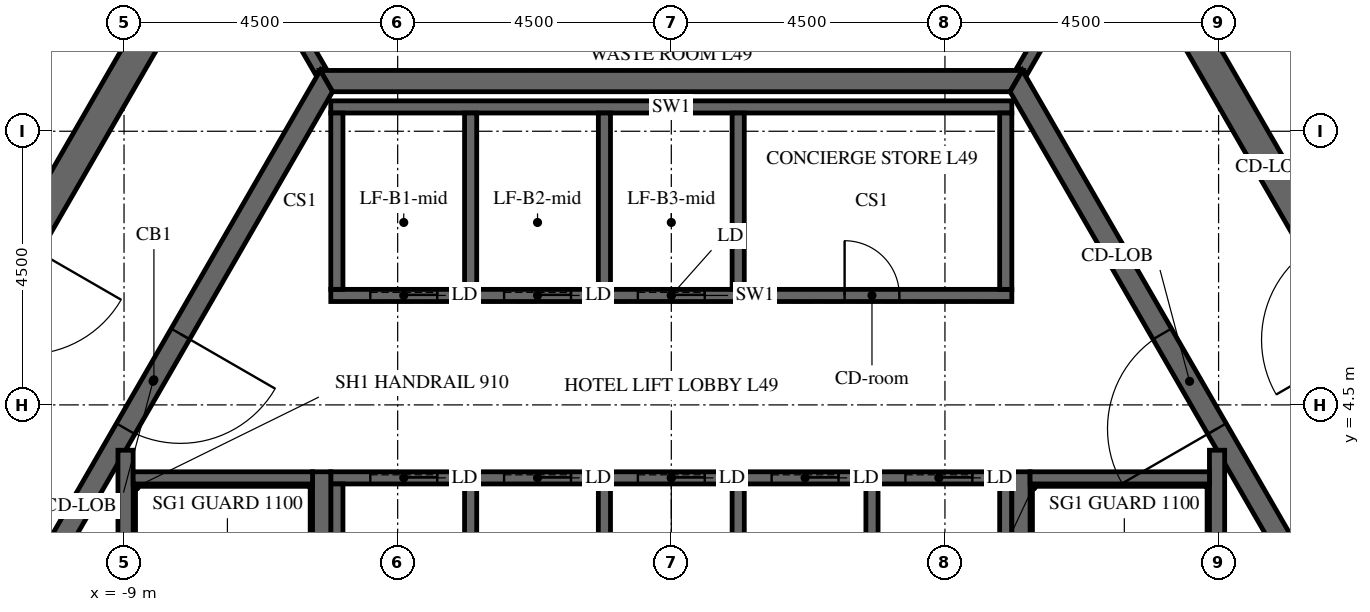
"""IFC4 building model, lengths in metres.
Left out: names, types, materials, properties, quantities, classifications, styles, units other than length and angle.
Written with IfcOpenShell. Run it as: python <this file> out.ifc"""

import sys

from ifc_helpers import new_model, si_unit, direction, frame, frame_2d, origin, place, context, subcontext, project, spatial, polyline, rectangle, outline, extrude, element, fill, save


model = new_model("IFC4")
c1 = context("Model", 3, precision=1e-05, world=origin(), true_north=direction((0.0, 1.0)))
c2 = subcontext(c1, "Body", "Model", "MODEL_VIEW")
j1 = project(units=[si_unit("LENGTHUNIT", "METRE"), si_unit("PLANEANGLEUNIT", "RADIAN")], contexts=[c1])
p1 = place(None, origin())
s1 = spatial("IfcSite", under=j1, at=p1, CompositionType="ELEMENT")
p2 = place(p1, origin())
s2 = spatial("IfcBuilding", under=s1, at=p2, CompositionType="ELEMENT")
p3 = place(p2, frame((0.0, 0.0, 207.3)))
s3 = spatial("IfcBuildingStorey", under=s2, at=p3, CompositionType="ELEMENT", Elevation=207.3)
p4 = place(p3, frame((-7.361, 12.75, -0.15), z_axis=(0.0, 0.0, 1.0), x_axis=(-0.50000571537, -0.866022103989, 0.0)))
e1 = element("IfcWall", 1, at=p4, inside=s3, PredefinedType="SHEAR", context=c2, shape_type="SweptSolid", body=[
    extrude(outline(polyline([(-0.144, -0.25), (14.867, -0.25), (14.578, 0.25), (0.144, 0.25), (-0.144, -0.25)])), origin(), (0.0, 0.0, 1.0), 3.9),
])
p5 = place(p4, frame((6.49, 0.0, 0.15)))
e2 = element("IfcOpeningElement", 2, at=p5, cuts=e1, PredefinedType="OPENING", context=c2, shape_type="SweptSolid", body=[
    extrude(rectangle(XDim=1.8, YDim=2.4, at=frame_2d((0.9, 1.2))), frame((0.0, 0.26, 0.0), z_axis=(0.0, -1.0, 0.0), x_axis=(1.0, 0.0, 0.0)), (0.0, 0.0, 1.0), 0.52),
])
p6 = place(p3, frame((14.722, 0.0, -0.15), z_axis=(0.0, 0.0, 1.0), x_axis=(-0.50000571537, 0.866022103989, 0.0)))
e3 = element("IfcWall", 3, at=p6, inside=s3, PredefinedType="SHEAR", context=c2, shape_type="SweptSolid", body=[
    extrude(outline(polyline([(-0.144, -0.25), (14.867, -0.25), (14.578, 0.25), (0.144, 0.25), (-0.144, -0.25)])), origin(), (0.0, 0.0, 1.0), 3.9),
])
p7 = place(p6, frame((6.432, 0.0, 0.15)))
e4 = element("IfcOpeningElement", 4, at=p7, cuts=e3, PredefinedType="OPENING", context=c2, shape_type="SweptSolid", body=[
    extrude(rectangle(XDim=1.8, YDim=2.4, at=frame_2d((0.9, 1.2))), frame((0.0, 0.26, 0.0), z_axis=(0.0, -1.0, 0.0), x_axis=(1.0, 0.0, 0.0)), (0.0, 0.0, 1.0), 0.52),
])
p8 = place(p3, frame((-5.673, 9.825, -0.15), z_axis=(0.0, 0.0, 1.0), x_axis=(-0.499995046907, -0.866028263435, 0.0)))
e5 = element("IfcWall", 5, at=p8, inside=s3, PredefinedType="SHEAR", context=c2, shape_type="SweptSolid", body=[
    extrude(outline(polyline([(-0.101, -0.175), (11.446, -0.175), (11.244, 0.175), (0.101, 0.175), (-0.101, -0.175)])), origin(), (0.0, 0.0, 1.0), 3.9),
])
p9 = place(p8, frame((4.801, 0.0, 0.15)))
e6 = element("IfcOpeningElement", 6, at=p9, cuts=e5, PredefinedType="OPENING", context=c2, shape_type="SweptSolid", body=[
    extrude(rectangle(XDim=1.8, YDim=2.4, at=frame_2d((0.9, 1.2))), frame((0.0, 0.185, 0.0), z_axis=(0.0, -1.0, 0.0), x_axis=(1.0, 0.0, 0.0)), (0.0, 0.0, 1.0), 0.37),
])
p10 = place(p3, frame((11.345, 0.0, -0.15), z_axis=(0.0, 0.0, 1.0), x_axis=(-0.499995046907, 0.866028263435, 0.0)))
e7 = element("IfcWall", 7, at=p10, inside=s3, PredefinedType="SHEAR", context=c2, shape_type="SweptSolid", body=[
    extrude(outline(polyline([(-0.101, -0.175), (11.446, -0.175), (11.244, 0.175), (0.101, 0.175), (-0.101, -0.175)])), origin(), (0.0, 0.0, 1.0), 3.9),
])
p11 = place(p10, frame((4.744, 0.0, 0.15)))
e8 = element("IfcOpeningElement", 8, at=p11, cuts=e7, PredefinedType="OPENING", context=c2, shape_type="SweptSolid", body=[
    extrude(rectangle(XDim=1.8, YDim=2.4, at=frame_2d((0.9, 1.2))), frame((0.0, 0.185, 0.0), z_axis=(0.0, -1.0, 0.0), x_axis=(1.0, 0.0, 0.0)), (0.0, 0.0, 1.0), 0.37),
])
p12 = place(p3, frame((5.673, 9.825, -0.15), z_axis=(0.0, 0.0, 1.0), x_axis=(-1.0, 0.0, 0.0)))
e9 = element("IfcWall", 9, at=p12, inside=s3, PredefinedType="SHEAR", context=c2, shape_type="SweptSolid", body=[
    extrude(outline(polyline([(-0.101, -0.175), (11.446, -0.175), (11.244, 0.175), (0.101, 0.175), (-0.101, -0.175)])), origin(), (0.0, 0.0, 1.0), 3.9),
])
p13 = place(p3, frame((-5.6, 6.3, -0.25), z_axis=(0.0, 0.0, 1.0), x_axis=(1.0, 0.0, 0.0)))
e10 = element("IfcWall", 10, at=p13, inside=s3, PredefinedType="SHEAR", context=c2, shape_type="SweptSolid", body=[
    extrude(rectangle(XDim=11.2, YDim=0.2, at=frame_2d((5.6, 0.0))), origin(), (0.0, 0.0, 1.0), 3.9),
])
p14 = place(p13, frame((8.45, 0.0, 0.25)))
e11 = element("IfcOpeningElement", 11, at=p14, cuts=e10, PredefinedType="OPENING", context=c2, shape_type="SweptSolid", body=[
    extrude(rectangle(XDim=0.9, YDim=2.1, at=frame_2d((0.45, 1.05))), frame((0.0, 0.11, 0.0), z_axis=(0.0, -1.0, 0.0), x_axis=(1.0, 0.0, 0.0)), (0.0, 0.0, 1.0), 0.22),
])
p15 = place(p13, frame((0.65, 0.0, 0.25)))
e12 = element("IfcOpeningElement", 12, at=p15, cuts=e10, PredefinedType="OPENING", context=c2, shape_type="SweptSolid", body=[
    extrude(rectangle(XDim=1.1, YDim=2.1, at=frame_2d((0.55, 1.05))), frame((0.0, 0.11, 0.0), z_axis=(0.0, -1.0, 0.0), x_axis=(1.0, 0.0, 0.0)), (0.0, 0.0, 1.0), 0.22),
])
p16 = place(p13, frame((2.85, 0.0, 0.25)))
e13 = element("IfcOpeningElement", 13, at=p16, cuts=e10, PredefinedType="OPENING", context=c2, shape_type="SweptSolid", body=[
    extrude(rectangle(XDim=1.1, YDim=2.1, at=frame_2d((0.55, 1.05))), frame((0.0, 0.11, 0.0), z_axis=(0.0, -1.0, 0.0), x_axis=(1.0, 0.0, 0.0)), (0.0, 0.0, 1.0), 0.22),
])
p17 = place(p13, frame((5.05, 0.0, 0.25)))
e14 = element("IfcOpeningElement", 14, at=p17, cuts=e10, PredefinedType="OPENING", context=c2, shape_type="SweptSolid", body=[
    extrude(rectangle(XDim=1.1, YDim=2.1, at=frame_2d((0.55, 1.05))), frame((0.0, 0.11, 0.0), z_axis=(0.0, -1.0, 0.0), x_axis=(1.0, 0.0, 0.0)), (0.0, 0.0, 1.0), 0.22),
])
p18 = place(p3, frame((-5.6, 9.4, -0.25), z_axis=(0.0, 0.0, 1.0), x_axis=(1.0, 0.0, 0.0)))
e15 = element("IfcWall", 15, at=p18, inside=s3, PredefinedType="SHEAR", context=c2, shape_type="SweptSolid", body=[
    extrude(rectangle(XDim=11.2, YDim=0.2, at=frame_2d((5.6, 0.0))), origin(), (0.0, 0.0, 1.0), 3.9),
])
for number, where, z_axis, x_axis in (
    (16, (-5.5, 6.4, -0.25), (0.0, 0.0, 1.0), (0.0, 1.0, 0.0)),
    (17, (-3.3, 6.4, -0.25), (0.0, 0.0, 1.0), (0.0, 1.0, 0.0)),
    (18, (-1.1, 6.4, -0.25), (0.0, 0.0, 1.0), (0.0, 1.0, 0.0)),
    (19, (1.1, 6.4, -0.25), (0.0, 0.0, 1.0), (0.0, 1.0, 0.0)),
    (20, (5.5, 6.4, -0.25), (0.0, 0.0, 1.0), (0.0, 1.0, 0.0)),
):
    element("IfcWall", number, at=place(p3, frame(where, z_axis=z_axis, x_axis=x_axis)), inside=s3, PredefinedType="SHEAR", context=c2, shape_type="SweptSolid", body=[
        extrude(rectangle(XDim=2.9, YDim=0.2, at=frame_2d((1.45, 0.0))), origin(), (0.0, 0.0, 1.0), 3.9),
    ])
p19 = place(p3, frame((-5.6, 3.3, -0.25), z_axis=(0.0, 0.0, 1.0), x_axis=(1.0, 0.0, 0.0)))
e21 = element("IfcWall", 21, at=p19, inside=s3, PredefinedType="SHEAR", context=c2, shape_type="SweptSolid", body=[
    extrude(rectangle(XDim=11.2, YDim=0.2, at=frame_2d((5.6, 0.0))), origin(), (0.0, 0.0, 1.0), 3.9),
])
p20 = place(p19, frame((0.65, 0.0, 0.25)))
e22 = element("IfcOpeningElement", 22, at=p20, cuts=e21, PredefinedType="OPENING", context=c2, shape_type="SweptSolid", body=[
    extrude(rectangle(XDim=1.1, YDim=2.1, at=frame_2d((0.55, 1.05))), frame((0.0, 0.11, 0.0), z_axis=(0.0, -1.0, 0.0), x_axis=(1.0, 0.0, 0.0)), (0.0, 0.0, 1.0), 0.22),
])
p21 = place(p19, frame((2.85, 0.0, 0.25)))
e23 = element("IfcOpeningElement", 23, at=p21, cuts=e21, PredefinedType="OPENING", context=c2, shape_type="SweptSolid", body=[
    extrude(rectangle(XDim=1.1, YDim=2.1, at=frame_2d((0.55, 1.05))), frame((0.0, 0.11, 0.0), z_axis=(0.0, -1.0, 0.0), x_axis=(1.0, 0.0, 0.0)), (0.0, 0.0, 1.0), 0.22),
])
p22 = place(p19, frame((5.05, 0.0, 0.25)))
e24 = element("IfcOpeningElement", 24, at=p22, cuts=e21, PredefinedType="OPENING", context=c2, shape_type="SweptSolid", body=[
    extrude(rectangle(XDim=1.1, YDim=2.1, at=frame_2d((0.55, 1.05))), frame((0.0, 0.11, 0.0), z_axis=(0.0, -1.0, 0.0), x_axis=(1.0, 0.0, 0.0)), (0.0, 0.0, 1.0), 0.22),
])
p23 = place(p19, frame((7.25, 0.0, 0.25)))
e25 = element("IfcOpeningElement", 25, at=p23, cuts=e21, PredefinedType="OPENING", context=c2, shape_type="SweptSolid", body=[
    extrude(rectangle(XDim=1.1, YDim=2.1, at=frame_2d((0.55, 1.05))), frame((0.0, 0.11, 0.0), z_axis=(0.0, -1.0, 0.0), x_axis=(1.0, 0.0, 0.0)), (0.0, 0.0, 1.0), 0.22),
])
p24 = place(p19, frame((9.45, 0.0, 0.25)))
e26 = element("IfcOpeningElement", 26, at=p24, cuts=e21, PredefinedType="OPENING", context=c2, shape_type="SweptSolid", body=[
    extrude(rectangle(XDim=1.1, YDim=2.1, at=frame_2d((0.55, 1.05))), frame((0.0, 0.11, 0.0), z_axis=(0.0, -1.0, 0.0), x_axis=(1.0, 0.0, 0.0)), (0.0, 0.0, 1.0), 0.22),
])
for number, where, z_axis, x_axis in (
    (27, (-5.5, 0.1, -0.25), (0.0, 0.0, 1.0), (0.0, 1.0, 0.0)),
    (28, (-3.3, 0.1, -0.25), (0.0, 0.0, 1.0), (0.0, 1.0, 0.0)),
    (29, (-1.1, 0.1, -0.25), (0.0, 0.0, 1.0), (0.0, 1.0, 0.0)),
    (30, (1.1, 0.1, -0.25), (0.0, 0.0, 1.0), (0.0, 1.0, 0.0)),
    (31, (3.3, 0.1, -0.25), (0.0, 0.0, 1.0), (0.0, 1.0, 0.0)),
    (32, (5.5, 0.1, -0.25), (0.0, 0.0, 1.0), (0.0, 1.0, 0.0)),
):
    element("IfcWall", number, at=place(p3, frame(where, z_axis=z_axis, x_axis=x_axis)), inside=s3, PredefinedType="SHEAR", context=c2, shape_type="SweptSolid", body=[
        extrude(rectangle(XDim=3.1, YDim=0.2, at=frame_2d((1.55, 0.0))), origin(), (0.0, 0.0, 1.0), 3.9),
    ])
for number, where, z_axis, x_axis in (
    (33, (5.773, 10.0, -0.15), (0.0, 0.0, 1.0), (0.5, 0.866, 0.0)),
    (34, (-5.773, 10.0, -0.15), (0.0, 0.0, 1.0), (-0.5, 0.866, 0.0)),
):
    element("IfcWall", number, at=place(p3, frame(where, z_axis=z_axis, x_axis=x_axis)), inside=s3, PredefinedType="SHEAR", context=c2, shape_type="SweptSolid", body=[
        extrude(rectangle(XDim=2.887, YDim=0.2, at=frame_2d((1.443, 0.0))), origin(), (0.0, 0.0, 1.0), 3.9),
    ])
p25 = place(p3, frame((5.75, -3.4, -0.25), z_axis=(0.0, 0.0, 1.0), x_axis=(0.0, 1.0, 0.0)))
e35 = element("IfcWall", 35, at=p25, inside=s3, PredefinedType="SHEAR", context=c2, shape_type="SweptSolid", body=[
    extrude(rectangle(XDim=6.8, YDim=0.3, at=frame_2d((3.4, 0.0))), origin(), (0.0, 0.0, 1.0), 3.9),
])
p26 = place(p3, frame((8.975, -3.755, -0.25), z_axis=(0.0, 0.0, 1.0), x_axis=(0.0, 1.0, 0.0)))
e36 = element("IfcWall", 36, at=p26, inside=s3, PredefinedType="SHEAR", context=c2, shape_type="SweptSolid", body=[
    extrude(rectangle(XDim=7.51, YDim=0.25, at=frame_2d((3.755, 0.0))), origin(), (0.0, 0.0, 1.0), 3.9),
])
p27 = place(p3, frame((5.9, 3.3, -0.25), z_axis=(0.0, 0.0, 1.0), x_axis=(1.0, 0.0, 0.0)))
e37 = element("IfcWall", 37, at=p27, inside=s3, PredefinedType="SHEAR", context=c2, shape_type="SweptSolid", body=[
    extrude(rectangle(XDim=2.95, YDim=0.2, at=frame_2d((1.475, 0.0))), origin(), (0.0, 0.0, 1.0), 3.9),
])
p28 = place(p3, frame((-5.75, -3.4, -0.25), z_axis=(0.0, 0.0, 1.0), x_axis=(0.0, 1.0, 0.0)))
e38 = element("IfcWall", 38, at=p28, inside=s3, PredefinedType="SHEAR", context=c2, shape_type="SweptSolid", body=[
    extrude(rectangle(XDim=6.8, YDim=0.3, at=frame_2d((3.4, 0.0))), origin(), (0.0, 0.0, 1.0), 3.9),
])
p29 = place(p3, frame((-8.975, -3.755, -0.25), z_axis=(0.0, 0.0, 1.0), x_axis=(0.0, 1.0, 0.0)))
e39 = element("IfcWall", 39, at=p29, inside=s3, PredefinedType="SHEAR", context=c2, shape_type="SweptSolid", body=[
    extrude(rectangle(XDim=7.51, YDim=0.25, at=frame_2d((3.755, 0.0))), origin(), (0.0, 0.0, 1.0), 3.9),
])
p30 = place(p3, frame((-8.85, 3.3, -0.25), z_axis=(0.0, 0.0, 1.0), x_axis=(1.0, 0.0, 0.0)))
e40 = element("IfcWall", 40, at=p30, inside=s3, PredefinedType="SHEAR", context=c2, shape_type="SweptSolid", body=[
    extrude(rectangle(XDim=2.95, YDim=0.2, at=frame_2d((1.475, 0.0))), origin(), (0.0, 0.0, 1.0), 3.9),
])
p31 = place(p3, frame((-8.673, 14.978, 0.0), z_axis=(0.0, 0.0, 1.0), x_axis=(-0.500009245501, -0.866020065826, 0.0)))
e41 = element("IfcWall", 41, at=p31, inside=s3, PredefinedType="PARTITIONING", context=c2, shape_type="SweptSolid", body=[
    extrude(rectangle(XDim=13.976, YDim=0.15, at=frame_2d((6.988, 0.0))), origin(), (0.0, 0.0, 1.0), 2.988),
])
p32 = place(p31, frame((9.26, 0.0, 0.0)))
e42 = element("IfcOpeningElement", 42, at=p32, cuts=e41, PredefinedType="OPENING", context=c2, shape_type="SweptSolid", body=[
    extrude(rectangle(XDim=1.0, YDim=2.1, at=frame_2d((0.5, 1.05))), frame((0.0, 0.085, 0.0), z_axis=(0.0, -1.0, 0.0), x_axis=(1.0, 0.0, 0.0)), (0.0, 0.0, 1.0), 0.17),
])
p33 = place(p3, frame((17.277, 0.075, 0.0), z_axis=(0.0, 0.0, 1.0), x_axis=(-0.499988884089, 0.866031821464, 0.0)))
e43 = element("IfcWall", 43, at=p33, inside=s3, PredefinedType="PARTITIONING", context=c2, shape_type="SweptSolid", body=[
    extrude(rectangle(XDim=14.78, YDim=0.15, at=frame_2d((7.39, 0.0))), origin(), (0.0, 0.0, 1.0), 2.988),
])
p34 = place(p33, frame((1.001, 0.0, 0.0)))
e44 = element("IfcOpeningElement", 44, at=p34, cuts=e43, PredefinedType="OPENING", context=c2, shape_type="SweptSolid", body=[
    extrude(rectangle(XDim=1.0, YDim=2.1, at=frame_2d((0.5, 1.05))), frame((0.0, 0.085, 0.0), z_axis=(0.0, -1.0, 0.0), x_axis=(1.0, 0.0, 0.0)), (0.0, 0.0, 1.0), 0.17),
])
p35 = place(p33, frame((5.0, 0.0, 0.0)))
e45 = element("IfcOpeningElement", 45, at=p35, cuts=e43, PredefinedType="OPENING", context=c2, shape_type="SweptSolid", body=[
    extrude(rectangle(XDim=1.0, YDim=2.1, at=frame_2d((0.5, 1.05))), frame((0.0, 0.085, 0.0), z_axis=(0.0, -1.0, 0.0), x_axis=(1.0, 0.0, 0.0)), (0.0, 0.0, 1.0), 0.17),
])
p36 = place(p33, frame((10.79, 0.0, 0.0)))
e46 = element("IfcOpeningElement", 46, at=p36, cuts=e43, PredefinedType="OPENING", context=c2, shape_type="SweptSolid", body=[
    extrude(rectangle(XDim=1.0, YDim=2.1, at=frame_2d((0.5, 1.05))), frame((0.0, 0.085, 0.0), z_axis=(0.0, -1.0, 0.0), x_axis=(1.0, 0.0, 0.0)), (0.0, 0.0, 1.0), 0.17),
])
p37 = place(p9, origin())
e47 = element("IfcDoor", 47, at=p37, inside=s3, OperationType="DOUBLE_DOOR_SINGLE_SWING", PredefinedType="DOOR", context=c2, shape_type="SweptSolid", body=[
    extrude(rectangle(XDim=1.8, YDim=2.4, at=frame_2d((0.9, 1.2))), frame((0.0, 0.025, 0.0), z_axis=(0.0, -1.0, 0.0), x_axis=(1.0, 0.0, 0.0)), (0.0, 0.0, 1.0), 0.05),
])
fill(e6, e47)
p38 = place(p11, origin())
e48 = element("IfcDoor", 48, at=p38, inside=s3, OperationType="DOUBLE_DOOR_SINGLE_SWING", PredefinedType="DOOR", context=c2, shape_type="SweptSolid", body=[
    extrude(rectangle(XDim=1.8, YDim=2.4, at=frame_2d((0.9, 1.2))), frame((0.0, 0.025, 0.0), z_axis=(0.0, -1.0, 0.0), x_axis=(1.0, 0.0, 0.0)), (0.0, 0.0, 1.0), 0.05),
])
fill(e8, e48)
p39 = place(p14, origin())
e49 = element("IfcDoor", 49, at=p39, inside=s3, OperationType="SINGLE_SWING_LEFT", PredefinedType="DOOR", context=c2, shape_type="SweptSolid", body=[
    extrude(rectangle(XDim=0.9, YDim=2.1, at=frame_2d((0.45, 1.05))), frame((0.0, 0.025, 0.0), z_axis=(0.0, -1.0, 0.0), x_axis=(1.0, 0.0, 0.0)), (0.0, 0.0, 1.0), 0.05),
])
fill(e11, e49)
p40 = place(p15, origin())
e50 = element("IfcDoor", 50, at=p40, inside=s3, OperationType="SLIDING_TO_LEFT", PredefinedType="DOOR", context=c2, shape_type="SweptSolid", body=[
    extrude(rectangle(XDim=1.1, YDim=2.1, at=frame_2d((0.55, 1.05))), frame((0.0, 0.025, 0.0), z_axis=(0.0, -1.0, 0.0), x_axis=(1.0, 0.0, 0.0)), (0.0, 0.0, 1.0), 0.05),
])
fill(e12, e50)
p41 = place(p16, origin())
e51 = element("IfcDoor", 51, at=p41, inside=s3, OperationType="SLIDING_TO_LEFT", PredefinedType="DOOR", context=c2, shape_type="SweptSolid", body=[
    extrude(rectangle(XDim=1.1, YDim=2.1, at=frame_2d((0.55, 1.05))), frame((0.0, 0.025, 0.0), z_axis=(0.0, -1.0, 0.0), x_axis=(1.0, 0.0, 0.0)), (0.0, 0.0, 1.0), 0.05),
])
fill(e13, e51)
p42 = place(p17, origin())
e52 = element("IfcDoor", 52, at=p42, inside=s3, OperationType="SLIDING_TO_LEFT", PredefinedType="DOOR", context=c2, shape_type="SweptSolid", body=[
    extrude(rectangle(XDim=1.1, YDim=2.1, at=frame_2d((0.55, 1.05))), frame((0.0, 0.025, 0.0), z_axis=(0.0, -1.0, 0.0), x_axis=(1.0, 0.0, 0.0)), (0.0, 0.0, 1.0), 0.05),
])
fill(e14, e52)
p43 = place(p20, origin())
e53 = element("IfcDoor", 53, at=p43, inside=s3, OperationType="SLIDING_TO_LEFT", PredefinedType="DOOR", context=c2, shape_type="SweptSolid", body=[
    extrude(rectangle(XDim=1.1, YDim=2.1, at=frame_2d((0.55, 1.05))), frame((0.0, 0.025, 0.0), z_axis=(0.0, -1.0, 0.0), x_axis=(1.0, 0.0, 0.0)), (0.0, 0.0, 1.0), 0.05),
])
fill(e22, e53)
p44 = place(p21, origin())
e54 = element("IfcDoor", 54, at=p44, inside=s3, OperationType="SLIDING_TO_LEFT", PredefinedType="DOOR", context=c2, shape_type="SweptSolid", body=[
    extrude(rectangle(XDim=1.1, YDim=2.1, at=frame_2d((0.55, 1.05))), frame((0.0, 0.025, 0.0), z_axis=(0.0, -1.0, 0.0), x_axis=(1.0, 0.0, 0.0)), (0.0, 0.0, 1.0), 0.05),
])
fill(e23, e54)
p45 = place(p22, origin())
e55 = element("IfcDoor", 55, at=p45, inside=s3, OperationType="SLIDING_TO_LEFT", PredefinedType="DOOR", context=c2, shape_type="SweptSolid", body=[
    extrude(rectangle(XDim=1.1, YDim=2.1, at=frame_2d((0.55, 1.05))), frame((0.0, 0.025, 0.0), z_axis=(0.0, -1.0, 0.0), x_axis=(1.0, 0.0, 0.0)), (0.0, 0.0, 1.0), 0.05),
])
fill(e24, e55)
p46 = place(p23, origin())
e56 = element("IfcDoor", 56, at=p46, inside=s3, OperationType="SLIDING_TO_LEFT", PredefinedType="DOOR", context=c2, shape_type="SweptSolid", body=[
    extrude(rectangle(XDim=1.1, YDim=2.1, at=frame_2d((0.55, 1.05))), frame((0.0, 0.025, 0.0), z_axis=(0.0, -1.0, 0.0), x_axis=(1.0, 0.0, 0.0)), (0.0, 0.0, 1.0), 0.05),
])
fill(e25, e56)
p47 = place(p24, origin())
e57 = element("IfcDoor", 57, at=p47, inside=s3, OperationType="SLIDING_TO_LEFT", PredefinedType="DOOR", context=c2, shape_type="SweptSolid", body=[
    extrude(rectangle(XDim=1.1, YDim=2.1, at=frame_2d((0.55, 1.05))), frame((0.0, 0.025, 0.0), z_axis=(0.0, -1.0, 0.0), x_axis=(1.0, 0.0, 0.0)), (0.0, 0.0, 1.0), 0.05),
])
fill(e26, e57)
save(model, sys.argv[1])
